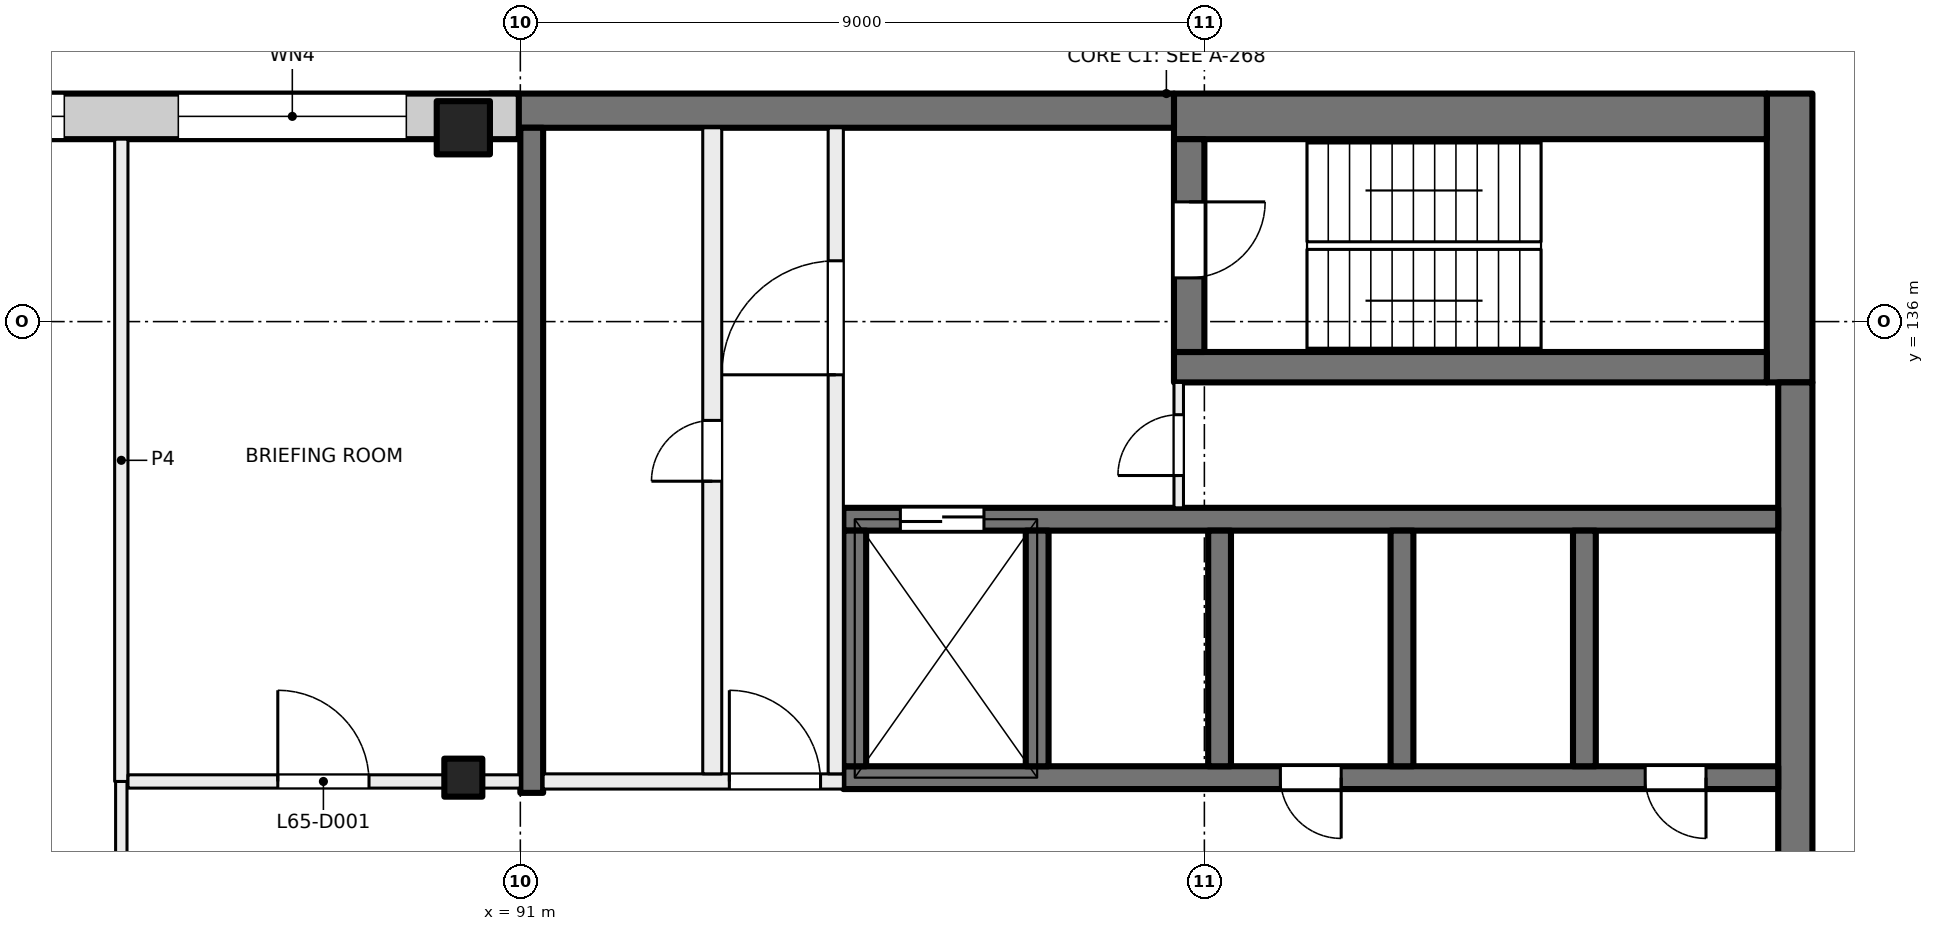
"""IFC4 building model, lengths in metres.
Left out: names, types, materials, properties, quantities, classifications, styles, units other than length and angle.
Written with IfcOpenShell. Run it as: python <this file> out.ifc"""

import sys

from ifc_helpers import new_model, si_unit, direction, frame, frame_2d, origin, origin_2d, place, context, subcontext, project, spatial, rectangle, extrude, element, fill, save


model = new_model("IFC4")
c1 = context("Model", 3, precision=1e-05, world=origin(), true_north=direction((0.0, 1.0)))
c2 = subcontext(c1, "Body", "Model", "MODEL_VIEW")
j1 = project(units=[si_unit("LENGTHUNIT", "METRE"), si_unit("PLANEANGLEUNIT", "RADIAN")], contexts=[c1])
p1 = place(None, origin())
s1 = spatial("IfcSite", under=j1, at=p1, CompositionType="ELEMENT")
p2 = place(p1, origin())
s2 = spatial("IfcBuilding", under=s1, at=p2, CompositionType="ELEMENT")
p3 = place(p2, frame((0.0, 0.0, 273.5)))
s3 = spatial("IfcBuildingStorey", under=s2, at=p3, CompositionType="ELEMENT", Elevation=273.5)
p4 = place(p3, frame((90.25, 130.0, 0.0), z_axis=(0.0, 0.0, 1.0), x_axis=(1.0, 0.0, 0.0)))
e1 = element("IfcColumn", 1, at=p4, inside=s3, PredefinedType="COLUMN", context=c2, shape_type="SweptSolid", body=[
    extrude(rectangle(XDim=0.5, YDim=0.5, at=origin_2d()), origin(), (0.0, 0.0, 1.0), 4.0),
])
p5 = place(p3, frame((90.25, 138.55, 0.0), z_axis=(0.0, 0.0, 1.0), x_axis=(1.0, 0.0, 0.0)))
e2 = element("IfcColumn", 2, at=p5, inside=s3, PredefinedType="COLUMN", context=c2, shape_type="SweptSolid", body=[
    extrude(rectangle(XDim=0.7, YDim=0.7, at=origin_2d()), origin(), (0.0, 0.0, 1.0), 4.0),
])
p6 = place(p3, frame((107.7, 139.0, 0.0), z_axis=(0.0, 0.0, 1.0), x_axis=(0.0, -1.0, 0.0)))
e3 = element("IfcWall", 3, at=p6, inside=s3, PredefinedType="SHEAR", context=c2, shape_type="SweptSolid", body=[
    extrude(rectangle(XDim=3.8, YDim=0.6, at=frame_2d((1.9, 0.0))), origin(), (0.0, 0.0, 1.0), 4.0),
])
p7 = place(p3, frame((107.775, 135.2, 0.0), z_axis=(0.0, 0.0, 1.0), x_axis=(0.0, -1.0, 0.0)))
e4 = element("IfcWall", 4, at=p7, inside=s3, PredefinedType="SHEAR", context=c2, shape_type="SweptSolid", body=[
    extrude(rectangle(XDim=14.4, YDim=0.45, at=frame_2d((7.2, 0.0))), origin(), (0.0, 0.0, 1.0), 4.0),
])
p8 = place(p3, frame((107.4, 138.7, 0.0), z_axis=(0.0, 0.0, 1.0), x_axis=(-1.0, 0.0, 0.0)))
e5 = element("IfcWall", 5, at=p8, inside=s3, PredefinedType="SHEAR", context=c2, shape_type="SweptSolid", body=[
    extrude(rectangle(XDim=7.8, YDim=0.6, at=frame_2d((3.9, 0.0))), origin(), (0.0, 0.0, 1.0), 4.0),
])
p9 = place(p3, frame((99.6, 138.775, 0.0), z_axis=(0.0, 0.0, 1.0), x_axis=(-1.0, 0.0, 0.0)))
e6 = element("IfcWall", 6, at=p9, inside=s3, PredefinedType="SHEAR", context=c2, shape_type="SweptSolid", body=[
    extrude(rectangle(XDim=9.0, YDim=0.45, at=frame_2d((4.5, 0.0))), origin(), (0.0, 0.0, 1.0), 4.0),
])
p10 = place(p3, frame((107.4, 135.4, 0.0), z_axis=(0.0, 0.0, 1.0), x_axis=(-1.0, 0.0, 0.0)))
e7 = element("IfcWall", 7, at=p10, inside=s3, PredefinedType="SHEAR", context=c2, shape_type="SweptSolid", body=[
    extrude(rectangle(XDim=7.8, YDim=0.4, at=frame_2d((3.9, 0.0))), origin(), (0.0, 0.0, 1.0), 4.0),
])
p11 = place(p3, frame((99.8, 138.4, 0.0), z_axis=(0.0, 0.0, 1.0), x_axis=(0.0, -1.0, 0.0)))
e8 = element("IfcWall", 8, at=p11, inside=s3, PredefinedType="SHEAR", context=c2, shape_type="SweptSolid", body=[
    extrude(rectangle(XDim=2.8, YDim=0.4, at=frame_2d((1.4, 0.0))), origin(), (0.0, 0.0, 1.0), 4.0),
])
p12 = place(p11, frame((0.825, 0.0, 0.0)))
e9 = element("IfcOpeningElement", 9, at=p12, cuts=e8, PredefinedType="OPENING", context=c2, shape_type="SweptSolid", body=[
    extrude(rectangle(XDim=1.0, YDim=2.1, at=frame_2d((0.5, 1.05))), frame((0.0, 0.21, 0.0), z_axis=(0.0, -1.0, 0.0), x_axis=(1.0, 0.0, 0.0)), (0.0, 0.0, 1.0), 0.42),
])
p13 = place(p3, frame((107.55, 130.0, 0.0), z_axis=(0.0, 0.0, 1.0), x_axis=(-1.0, 0.0, 0.0)))
e10 = element("IfcWall", 10, at=p13, inside=s3, PredefinedType="SHEAR", context=c2, shape_type="SweptSolid", body=[
    extrude(rectangle(XDim=12.3, YDim=0.3, at=frame_2d((6.15, 0.0))), origin(), (0.0, 0.0, 1.0), 4.0),
])
p14 = place(p13, frame((0.95, 0.0, 0.0)))
e11 = element("IfcOpeningElement", 11, at=p14, cuts=e10, PredefinedType="OPENING", context=c2, shape_type="SweptSolid", body=[
    extrude(rectangle(XDim=0.8, YDim=2.1, at=frame_2d((0.4, 1.05))), frame((0.0, 0.16, 0.0), z_axis=(0.0, -1.0, 0.0), x_axis=(1.0, 0.0, 0.0)), (0.0, 0.0, 1.0), 0.32),
])
p15 = place(p13, frame((5.75, 0.0, 0.0)))
e12 = element("IfcOpeningElement", 12, at=p15, cuts=e10, PredefinedType="OPENING", context=c2, shape_type="SweptSolid", body=[
    extrude(rectangle(XDim=0.8, YDim=2.1, at=frame_2d((0.4, 1.05))), frame((0.0, 0.16, 0.0), z_axis=(0.0, -1.0, 0.0), x_axis=(1.0, 0.0, 0.0)), (0.0, 0.0, 1.0), 0.32),
])
p16 = place(p3, frame((107.55, 133.4, 0.0), z_axis=(0.0, 0.0, 1.0), x_axis=(-1.0, 0.0, 0.0)))
e13 = element("IfcWall", 13, at=p16, inside=s3, PredefinedType="SHEAR", context=c2, shape_type="SweptSolid", body=[
    extrude(rectangle(XDim=12.3, YDim=0.3, at=frame_2d((6.15, 0.0))), origin(), (0.0, 0.0, 1.0), 4.0),
])
p17 = place(p16, frame((10.45, 0.0, 0.0)))
e14 = element("IfcOpeningElement", 14, at=p17, cuts=e13, PredefinedType="OPENING", context=c2, shape_type="SweptSolid", body=[
    extrude(rectangle(XDim=1.1, YDim=2.1, at=frame_2d((0.55, 1.05))), frame((0.0, 0.16, 0.0), z_axis=(0.0, -1.0, 0.0), x_axis=(1.0, 0.0, 0.0)), (0.0, 0.0, 1.0), 0.32),
])
for number, where, z_axis, x_axis in (
    (15, (105.0, 133.25, 0.0), (0.0, 0.0, 1.0), (0.0, -1.0, 0.0)),
    (16, (102.6, 133.25, 0.0), (0.0, 0.0, 1.0), (0.0, -1.0, 0.0)),
    (17, (100.2, 133.25, 0.0), (0.0, 0.0, 1.0), (0.0, -1.0, 0.0)),
    (18, (97.8, 133.25, 0.0), (0.0, 0.0, 1.0), (0.0, -1.0, 0.0)),
    (19, (95.4, 133.25, 0.0), (0.0, 0.0, 1.0), (0.0, -1.0, 0.0)),
):
    element("IfcWall", number, at=place(p3, frame(where, z_axis=z_axis, x_axis=x_axis)), inside=s3, PredefinedType="SHEAR", context=c2, shape_type="SweptSolid", body=[
        extrude(rectangle(XDim=3.1, YDim=0.3, at=frame_2d((1.55, 0.0))), origin(), (0.0, 0.0, 1.0), 4.0),
    ])
p18 = place(p3, frame((91.15, 138.55, 0.0), z_axis=(0.0, 0.0, 1.0), x_axis=(0.0, -1.0, 0.0)))
e20 = element("IfcWall", 20, at=p18, inside=s3, PredefinedType="SHEAR", context=c2, shape_type="SweptSolid", body=[
    extrude(rectangle(XDim=8.75, YDim=0.3, at=frame_2d((4.375, 0.0))), origin(), (0.0, 0.0, 1.0), 4.0),
])
p19 = place(p3, frame((47.07, 138.7, 0.0), z_axis=(0.0, 0.0, 1.0), x_axis=(1.0, 0.0, 0.0)))
e21 = element("IfcWall", 21, at=p19, inside=s3, PredefinedType="SOLIDWALL", context=c2, shape_type="SweptSolid", body=[
    extrude(rectangle(XDim=43.91, YDim=0.6, at=frame_2d((21.955, 0.0))), origin(), (0.0, 0.0, 1.0), 3.625),
])
p20 = place(p19, frame((3.43, 0.0, 0.9)))
e22 = element("IfcOpeningElement", 22, at=p20, cuts=e21, PredefinedType="OPENING", context=c2, shape_type="SweptSolid", body=[
    extrude(rectangle(XDim=3.0, YDim=2.4, at=frame_2d((1.5, 1.2))), frame((0.0, 0.31, 0.0), z_axis=(0.0, -1.0, 0.0), x_axis=(1.0, 0.0, 0.0)), (0.0, 0.0, 1.0), 0.62),
])
p21 = place(p19, frame((7.93, 0.0, 0.9)))
e23 = element("IfcOpeningElement", 23, at=p21, cuts=e21, PredefinedType="OPENING", context=c2, shape_type="SweptSolid", body=[
    extrude(rectangle(XDim=3.0, YDim=2.4, at=frame_2d((1.5, 1.2))), frame((0.0, 0.31, 0.0), z_axis=(0.0, -1.0, 0.0), x_axis=(1.0, 0.0, 0.0)), (0.0, 0.0, 1.0), 0.62),
])
p22 = place(p19, frame((12.43, 0.0, 0.9)))
e24 = element("IfcOpeningElement", 24, at=p22, cuts=e21, PredefinedType="OPENING", context=c2, shape_type="SweptSolid", body=[
    extrude(rectangle(XDim=3.0, YDim=2.4, at=frame_2d((1.5, 1.2))), frame((0.0, 0.31, 0.0), z_axis=(0.0, -1.0, 0.0), x_axis=(1.0, 0.0, 0.0)), (0.0, 0.0, 1.0), 0.62),
])
p23 = place(p19, frame((16.93, 0.0, 0.9)))
e25 = element("IfcOpeningElement", 25, at=p23, cuts=e21, PredefinedType="OPENING", context=c2, shape_type="SweptSolid", body=[
    extrude(rectangle(XDim=3.0, YDim=2.4, at=frame_2d((1.5, 1.2))), frame((0.0, 0.31, 0.0), z_axis=(0.0, -1.0, 0.0), x_axis=(1.0, 0.0, 0.0)), (0.0, 0.0, 1.0), 0.62),
])
p24 = place(p19, frame((21.43, 0.0, 0.9)))
e26 = element("IfcOpeningElement", 26, at=p24, cuts=e21, PredefinedType="OPENING", context=c2, shape_type="SweptSolid", body=[
    extrude(rectangle(XDim=3.0, YDim=2.4, at=frame_2d((1.5, 1.2))), frame((0.0, 0.31, 0.0), z_axis=(0.0, -1.0, 0.0), x_axis=(1.0, 0.0, 0.0)), (0.0, 0.0, 1.0), 0.62),
])
p25 = place(p19, frame((25.93, 0.0, 0.9)))
e27 = element("IfcOpeningElement", 27, at=p25, cuts=e21, PredefinedType="OPENING", context=c2, shape_type="SweptSolid", body=[
    extrude(rectangle(XDim=3.0, YDim=2.4, at=frame_2d((1.5, 1.2))), frame((0.0, 0.31, 0.0), z_axis=(0.0, -1.0, 0.0), x_axis=(1.0, 0.0, 0.0)), (0.0, 0.0, 1.0), 0.62),
])
p26 = place(p19, frame((30.43, 0.0, 0.9)))
e28 = element("IfcOpeningElement", 28, at=p26, cuts=e21, PredefinedType="OPENING", context=c2, shape_type="SweptSolid", body=[
    extrude(rectangle(XDim=3.0, YDim=2.4, at=frame_2d((1.5, 1.2))), frame((0.0, 0.31, 0.0), z_axis=(0.0, -1.0, 0.0), x_axis=(1.0, 0.0, 0.0)), (0.0, 0.0, 1.0), 0.62),
])
p27 = place(p19, frame((34.93, 0.0, 0.9)))
e29 = element("IfcOpeningElement", 29, at=p27, cuts=e21, PredefinedType="OPENING", context=c2, shape_type="SweptSolid", body=[
    extrude(rectangle(XDim=3.0, YDim=2.4, at=frame_2d((1.5, 1.2))), frame((0.0, 0.31, 0.0), z_axis=(0.0, -1.0, 0.0), x_axis=(1.0, 0.0, 0.0)), (0.0, 0.0, 1.0), 0.62),
])
p28 = place(p19, frame((39.43, 0.0, 0.9)))
e30 = element("IfcOpeningElement", 30, at=p28, cuts=e21, PredefinedType="OPENING", context=c2, shape_type="SweptSolid", body=[
    extrude(rectangle(XDim=3.0, YDim=2.4, at=frame_2d((1.5, 1.2))), frame((0.0, 0.31, 0.0), z_axis=(0.0, -1.0, 0.0), x_axis=(1.0, 0.0, 0.0)), (0.0, 0.0, 1.0), 0.62),
])
p29 = place(p3, frame((91.3, 129.95, 0.0), z_axis=(0.0, 0.0, 1.0), x_axis=(1.0, 0.0, 0.0)))
e31 = element("IfcWall", 31, at=p29, inside=s3, PredefinedType="PARTITIONING", context=c2, shape_type="SweptSolid", body=[
    extrude(rectangle(XDim=3.95, YDim=0.2, at=frame_2d((1.975, 0.0))), origin(), (0.0, 0.0, 1.0), 3.625),
])
p30 = place(p29, frame((2.45, 0.0, 0.0)))
e32 = element("IfcOpeningElement", 32, at=p30, cuts=e31, PredefinedType="OPENING", context=c2, shape_type="SweptSolid", body=[
    extrude(rectangle(XDim=1.2, YDim=2.1, at=frame_2d((0.6, 1.05))), frame((0.0, 0.11, 0.0), z_axis=(0.0, -1.0, 0.0), x_axis=(1.0, 0.0, 0.0)), (0.0, 0.0, 1.0), 0.22),
])
p31 = place(p3, frame((95.15, 130.05, 0.0), z_axis=(0.0, 0.0, 1.0), x_axis=(0.0, 1.0, 0.0)))
e33 = element("IfcWall", 33, at=p31, inside=s3, PredefinedType="PARTITIONING", context=c2, shape_type="SweptSolid", body=[
    extrude(rectangle(XDim=8.5, YDim=0.2, at=frame_2d((4.25, 0.0))), origin(), (0.0, 0.0, 1.0), 3.625),
])
p32 = place(p31, frame((5.25, 0.0, 0.0)))
e34 = element("IfcOpeningElement", 34, at=p32, cuts=e33, PredefinedType="OPENING", context=c2, shape_type="SweptSolid", body=[
    extrude(rectangle(XDim=1.5, YDim=2.1, at=frame_2d((0.75, 1.05))), frame((0.0, 0.11, 0.0), z_axis=(0.0, -1.0, 0.0), x_axis=(1.0, 0.0, 0.0)), (0.0, 0.0, 1.0), 0.22),
])
p33 = place(p3, frame((93.525, 130.05, 0.0), z_axis=(0.0, 0.0, 1.0), x_axis=(0.0, 1.0, 0.0)))
e35 = element("IfcWall", 35, at=p33, inside=s3, PredefinedType="PARTITIONING", context=c2, shape_type="SweptSolid", body=[
    extrude(rectangle(XDim=8.5, YDim=0.25, at=frame_2d((4.25, 0.0))), origin(), (0.0, 0.0, 1.0), 3.625),
])
p34 = place(p33, frame((3.85, 0.0, 0.0)))
e36 = element("IfcOpeningElement", 36, at=p34, cuts=e35, PredefinedType="OPENING", context=c2, shape_type="SweptSolid", body=[
    extrude(rectangle(XDim=0.8, YDim=2.1, at=frame_2d((0.4, 1.05))), frame((0.0, 0.135, 0.0), z_axis=(0.0, -1.0, 0.0), x_axis=(1.0, 0.0, 0.0)), (0.0, 0.0, 1.0), 0.27),
])
p35 = place(p3, frame((99.663, 133.55, 0.0), z_axis=(0.0, 0.0, 1.0), x_axis=(0.0, 1.0, 0.0)))
e37 = element("IfcWall", 37, at=p35, inside=s3, PredefinedType="PARTITIONING", context=c2, shape_type="SweptSolid", body=[
    extrude(rectangle(XDim=1.65, YDim=0.125, at=frame_2d((0.825, 0.0))), origin(), (0.0, 0.0, 1.0), 3.625),
])
p36 = place(p35, frame((0.425, 0.0, 0.0)))
e38 = element("IfcOpeningElement", 38, at=p36, cuts=e37, PredefinedType="OPENING", context=c2, shape_type="SweptSolid", body=[
    extrude(rectangle(XDim=0.8, YDim=2.1, at=frame_2d((0.4, 1.05))), frame((0.0, 0.073, 0.0), z_axis=(0.0, -1.0, 0.0), x_axis=(1.0, 0.0, 0.0)), (0.0, 0.0, 1.0), 0.145),
])
p37 = place(p3, frame((85.75, 121.5, 0.0), z_axis=(0.0, 0.0, 1.0), x_axis=(0.0, 1.0, 0.0)))
e39 = element("IfcWall", 39, at=p37, inside=s3, PredefinedType="PARTITIONING", context=c2, shape_type="SweptSolid", body=[
    extrude(rectangle(XDim=8.45, YDim=0.15, at=frame_2d((4.225, 0.0))), origin(), (0.0, 0.0, 1.0), 3.625),
])
p38 = place(p3, frame((85.75, 129.95, 0.0), z_axis=(0.0, 0.0, 1.0), x_axis=(0.0, 1.0, 0.0)))
e40 = element("IfcWall", 40, at=p38, inside=s3, PredefinedType="PARTITIONING", context=c2, shape_type="SweptSolid", body=[
    extrude(rectangle(XDim=8.45, YDim=0.175, at=frame_2d((4.225, 0.0))), origin(), (0.0, 0.0, 1.0), 3.625),
])
p39 = place(p3, frame((85.838, 129.95, 0.0), z_axis=(0.0, 0.0, 1.0), x_axis=(1.0, 0.0, 0.0)))
e41 = element("IfcWall", 41, at=p39, inside=s3, PredefinedType="PARTITIONING", context=c2, shape_type="SweptSolid", body=[
    extrude(rectangle(XDim=5.162, YDim=0.175, at=frame_2d((2.581, 0.0))), origin(), (0.0, 0.0, 1.0), 3.625),
])
p40 = place(p39, frame((1.971, 0.0, 0.0)))
e42 = element("IfcOpeningElement", 42, at=p40, cuts=e41, PredefinedType="OPENING", context=c2, shape_type="SweptSolid", body=[
    extrude(rectangle(XDim=1.2, YDim=2.1, at=frame_2d((0.6, 1.05))), frame((0.0, 0.097, 0.0), z_axis=(0.0, -1.0, 0.0), x_axis=(1.0, 0.0, 0.0)), (0.0, 0.0, 1.0), 0.195),
])
p41 = place(p27, origin())
e43 = element("IfcWindow", 43, at=p41, inside=s3, PartitioningType="SINGLE_PANEL", PredefinedType="WINDOW", context=c2, shape_type="SweptSolid", body=[
    extrude(rectangle(XDim=3.0, YDim=2.4, at=frame_2d((1.5, 1.2))), frame((0.0, 0.03, 0.0), z_axis=(0.0, -1.0, 0.0), x_axis=(1.0, 0.0, 0.0)), (0.0, 0.0, 1.0), 0.06),
])
fill(e29, e43)
p42 = place(p28, origin())
e44 = element("IfcWindow", 44, at=p42, inside=s3, PartitioningType="SINGLE_PANEL", PredefinedType="WINDOW", context=c2, shape_type="SweptSolid", body=[
    extrude(rectangle(XDim=3.0, YDim=2.4, at=frame_2d((1.5, 1.2))), frame((0.0, 0.03, 0.0), z_axis=(0.0, -1.0, 0.0), x_axis=(1.0, 0.0, 0.0)), (0.0, 0.0, 1.0), 0.06),
])
fill(e30, e44)
p43 = place(p14, origin())
e45 = element("IfcDoor", 45, at=p43, inside=s3, OperationType="SINGLE_SWING_LEFT", PredefinedType="DOOR", context=c2, shape_type="SweptSolid", body=[
    extrude(rectangle(XDim=0.8, YDim=2.1, at=frame_2d((0.4, 1.05))), frame((0.0, 0.025, 0.0), z_axis=(0.0, -1.0, 0.0), x_axis=(1.0, 0.0, 0.0)), (0.0, 0.0, 1.0), 0.05),
])
fill(e11, e45)
p44 = place(p15, origin())
e46 = element("IfcDoor", 46, at=p44, inside=s3, OperationType="SINGLE_SWING_RIGHT", PredefinedType="DOOR", context=c2, shape_type="SweptSolid", body=[
    extrude(rectangle(XDim=0.8, YDim=2.1, at=frame_2d((0.4, 1.05))), frame((0.0, 0.025, 0.0), z_axis=(0.0, -1.0, 0.0), x_axis=(1.0, 0.0, 0.0)), (0.0, 0.0, 1.0), 0.05),
])
fill(e12, e46)
p45 = place(p30, origin())
e47 = element("IfcDoor", 47, at=p45, inside=s3, OperationType="DOUBLE_DOOR_SINGLE_SWING", PredefinedType="DOOR", context=c2, shape_type="SweptSolid", body=[
    extrude(rectangle(XDim=1.2, YDim=2.1, at=frame_2d((0.6, 1.05))), frame((0.0, 0.025, 0.0), z_axis=(0.0, -1.0, 0.0), x_axis=(1.0, 0.0, 0.0)), (0.0, 0.0, 1.0), 0.05),
])
fill(e32, e47)
p46 = place(p32, origin())
e48 = element("IfcDoor", 48, at=p46, inside=s3, OperationType="DOUBLE_DOOR_SINGLE_SWING", PredefinedType="DOOR", context=c2, shape_type="SweptSolid", body=[
    extrude(rectangle(XDim=1.5, YDim=2.1, at=frame_2d((0.75, 1.05))), frame((0.0, 0.025, 0.0), z_axis=(0.0, -1.0, 0.0), x_axis=(1.0, 0.0, 0.0)), (0.0, 0.0, 1.0), 0.05),
])
fill(e34, e48)
p47 = place(p12, origin())
e49 = element("IfcDoor", 49, at=p47, inside=s3, OperationType="SINGLE_SWING_RIGHT", PredefinedType="DOOR", context=c2, shape_type="SweptSolid", body=[
    extrude(rectangle(XDim=1.0, YDim=2.1, at=frame_2d((0.5, 1.05))), frame((0.0, 0.025, 0.0), z_axis=(0.0, -1.0, 0.0), x_axis=(1.0, 0.0, 0.0)), (0.0, 0.0, 1.0), 0.05),
])
fill(e9, e49)
p48 = place(p36, origin())
e50 = element("IfcDoor", 50, at=p48, inside=s3, OperationType="SINGLE_SWING_LEFT", PredefinedType="DOOR", context=c2, shape_type="SweptSolid", body=[
    extrude(rectangle(XDim=0.8, YDim=2.1, at=frame_2d((0.4, 1.05))), frame((0.0, 0.025, 0.0), z_axis=(0.0, -1.0, 0.0), x_axis=(1.0, 0.0, 0.0)), (0.0, 0.0, 1.0), 0.05),
])
fill(e38, e50)
p49 = place(p34, origin())
e51 = element("IfcDoor", 51, at=p49, inside=s3, OperationType="SINGLE_SWING_RIGHT", PredefinedType="DOOR", context=c2, shape_type="SweptSolid", body=[
    extrude(rectangle(XDim=0.8, YDim=2.1, at=frame_2d((0.4, 1.05))), frame((0.0, 0.025, 0.0), z_axis=(0.0, -1.0, 0.0), x_axis=(1.0, 0.0, 0.0)), (0.0, 0.0, 1.0), 0.05),
])
fill(e36, e51)
p50 = place(p17, origin())
e52 = element("IfcDoor", 52, at=p50, inside=s3, OperationType="DOUBLE_DOOR_SLIDING", PredefinedType="DOOR", context=c2, shape_type="SweptSolid", body=[
    extrude(rectangle(XDim=1.1, YDim=2.1, at=frame_2d((0.55, 1.05))), frame((0.0, 0.025, 0.0), z_axis=(0.0, -1.0, 0.0), x_axis=(1.0, 0.0, 0.0)), (0.0, 0.0, 1.0), 0.05),
])
fill(e14, e52)
p51 = place(p40, origin())
e53 = element("IfcDoor", 53, at=p51, inside=s3, OperationType="DOUBLE_DOOR_SINGLE_SWING", PredefinedType="DOOR", context=c2, shape_type="SweptSolid", body=[
    extrude(rectangle(XDim=1.2, YDim=2.1, at=frame_2d((0.6, 1.05))), frame((0.0, 0.025, 0.0), z_axis=(0.0, -1.0, 0.0), x_axis=(1.0, 0.0, 0.0)), (0.0, 0.0, 1.0), 0.05),
])
fill(e42, e53)
save(model, sys.argv[1])
